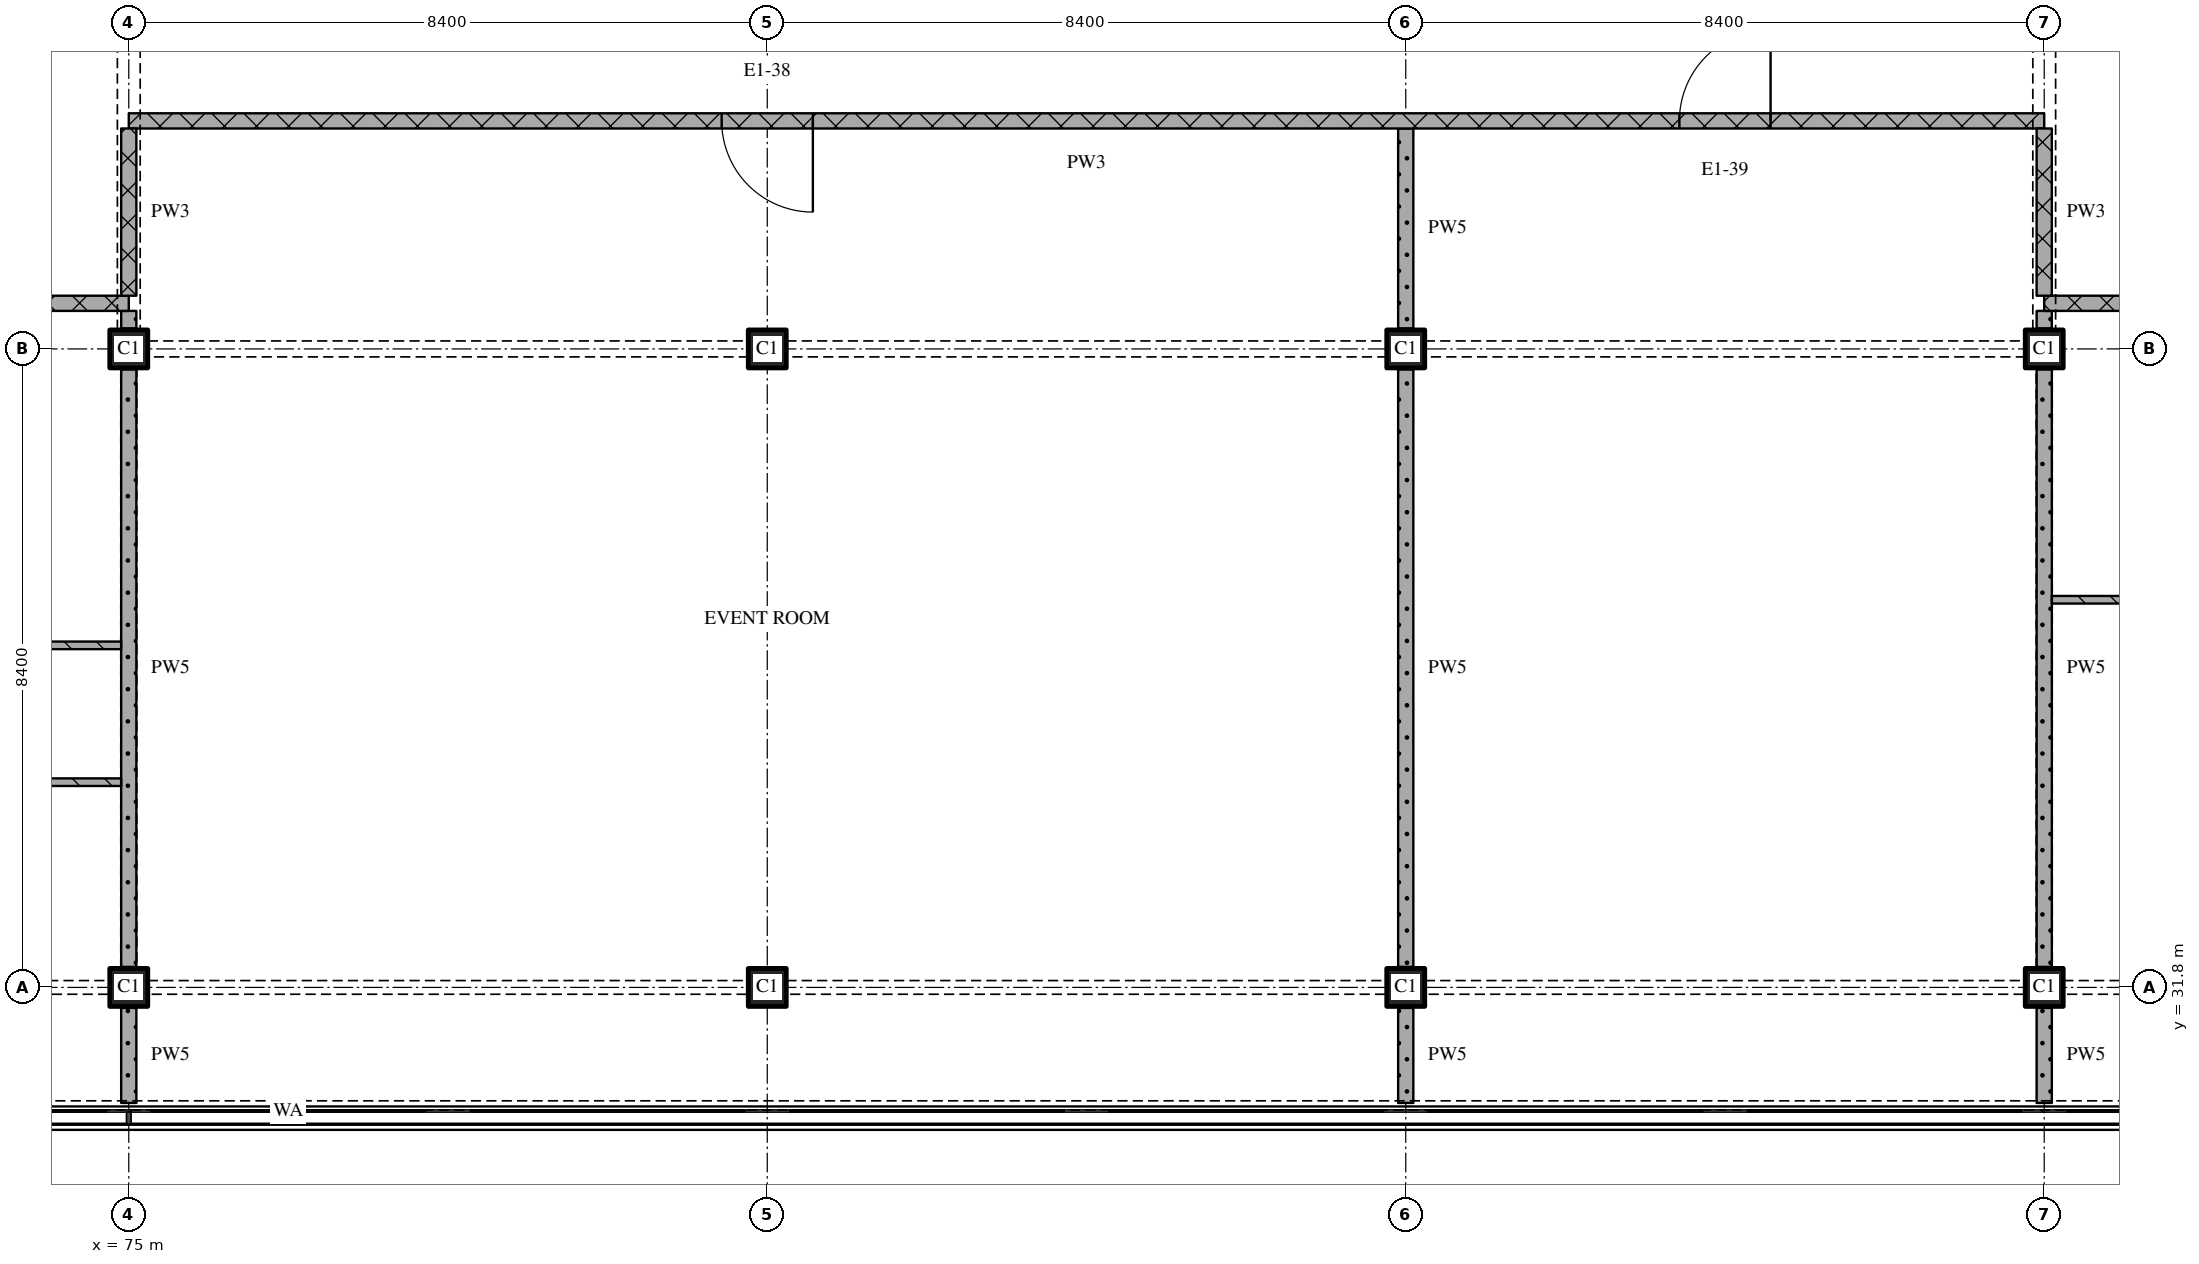
"""IFC4 building model, lengths in metres.
Left out: names, types, materials, properties, quantities, classifications, styles, units other than length and angle.
Written with IfcOpenShell. Run it as: python <this file> out.ifc"""

import sys

from ifc_helpers import new_model, si_unit, direction, frame, frame_2d, origin, origin_2d, place, context, subcontext, project, spatial, rectangle, extrude, element, fill, save


model = new_model("IFC4")
c1 = context("Model", 3, precision=1e-05, world=origin(), true_north=direction((0.0, 1.0)))
c2 = subcontext(c1, "Body", "Model", "MODEL_VIEW")
j1 = project(units=[si_unit("LENGTHUNIT", "METRE"), si_unit("PLANEANGLEUNIT", "RADIAN")], contexts=[c1])
p1 = place(None, origin())
s1 = spatial("IfcSite", under=j1, at=p1, CompositionType="ELEMENT")
p2 = place(p1, origin())
s2 = spatial("IfcBuilding", under=s1, at=p2, CompositionType="ELEMENT")
p3 = place(p2, frame((0.0, 0.0, 267.15)))
s3 = spatial("IfcBuildingStorey", under=s2, at=p3, CompositionType="ELEMENT", Elevation=267.15)
for number, where, z_axis, x_axis in (
    (1, (75.0, 31.8, 0.0), (0.0, 0.0, 1.0), (1.0, 0.0, 0.0)),
    (2, (75.0, 40.2, 0.0), (0.0, 0.0, 1.0), (1.0, 0.0, 0.0)),
    (3, (83.4, 31.8, 0.0), (0.0, 0.0, 1.0), (1.0, 0.0, 0.0)),
    (4, (83.4, 40.2, 0.0), (0.0, 0.0, 1.0), (1.0, 0.0, 0.0)),
    (5, (91.8, 31.8, 0.0), (0.0, 0.0, 1.0), (1.0, 0.0, 0.0)),
    (6, (91.8, 40.2, 0.0), (0.0, 0.0, 1.0), (1.0, 0.0, 0.0)),
    (7, (100.2, 31.8, 0.0), (0.0, 0.0, 1.0), (1.0, 0.0, 0.0)),
    (8, (100.2, 40.2, 0.0), (0.0, 0.0, 1.0), (1.0, 0.0, 0.0)),
):
    element("IfcColumn", number, at=place(p3, frame(where, z_axis=z_axis, x_axis=x_axis)), inside=s3, PredefinedType="COLUMN", context=c2, shape_type="SweptSolid", body=[
        extrude(rectangle(XDim=0.5, YDim=0.5, at=origin_2d()), origin(), (0.0, 0.0, 1.0), 3.6),
    ])
p4 = place(p3, frame((74.9, 34.5, 0.0), z_axis=(0.0, 0.0, 1.0), x_axis=(-1.0, 0.0, 0.0)))
e9 = element("IfcWall", 9, at=p4, inside=s3, PredefinedType="PARTITIONING", context=c2, shape_type="SweptSolid", body=[
    extrude(rectangle(XDim=16.7, YDim=0.1, at=frame_2d((8.35, 0.0))), origin(), (0.0, 0.0, 1.0), 3.32),
])
p5 = place(p4, frame((3.65, 0.0, 0.0)))
e10 = element("IfcOpeningElement", 10, at=p5, cuts=e9, PredefinedType="OPENING", context=c2, shape_type="SweptSolid", body=[
    extrude(rectangle(XDim=0.9, YDim=2.1, at=frame_2d((0.45, 1.05))), frame((0.0, 0.06, 0.0), z_axis=(0.0, -1.0, 0.0), x_axis=(1.0, 0.0, 0.0)), (0.0, 0.0, 1.0), 0.12),
])
p6 = place(p4, frame((12.05, 0.0, 0.0)))
e11 = element("IfcOpeningElement", 11, at=p6, cuts=e9, PredefinedType="OPENING", context=c2, shape_type="SweptSolid", body=[
    extrude(rectangle(XDim=0.9, YDim=2.1, at=frame_2d((0.45, 1.05))), frame((0.0, 0.06, 0.0), z_axis=(0.0, -1.0, 0.0), x_axis=(1.0, 0.0, 0.0)), (0.0, 0.0, 1.0), 0.12),
])
p7 = place(p3, frame((69.0, 36.3, 0.0), z_axis=(0.0, 0.0, 1.0), x_axis=(1.0, 0.0, 0.0)))
e12 = element("IfcWall", 12, at=p7, inside=s3, PredefinedType="PARTITIONING", context=c2, shape_type="SweptSolid", body=[
    extrude(rectangle(XDim=5.9, YDim=0.1, at=frame_2d((2.95, 0.0))), origin(), (0.0, 0.0, 1.0), 3.32),
])
p8 = place(p7, frame((2.55, 0.0, 0.0)))
e13 = element("IfcOpeningElement", 13, at=p8, cuts=e12, PredefinedType="OPENING", context=c2, shape_type="SweptSolid", body=[
    extrude(rectangle(XDim=0.9, YDim=2.1, at=frame_2d((0.45, 1.05))), frame((0.0, 0.06, 0.0), z_axis=(0.0, -1.0, 0.0), x_axis=(1.0, 0.0, 0.0)), (0.0, 0.0, 1.0), 0.12),
])
p9 = place(p3, frame((100.3, 36.9, 0.0), z_axis=(0.0, 0.0, 1.0), x_axis=(1.0, 0.0, 0.0)))
e14 = element("IfcWall", 14, at=p9, inside=s3, PredefinedType="PARTITIONING", context=c2, shape_type="SweptSolid", body=[
    extrude(rectangle(XDim=4.1, YDim=0.1, at=frame_2d((2.05, 0.0))), origin(), (0.0, 0.0, 1.0), 3.32),
])
p10 = place(p3, frame((75.0, 40.8, 0.0), z_axis=(0.0, 0.0, 1.0), x_axis=(-1.0, 0.0, 0.0)))
e15 = element("IfcWall", 15, at=p10, inside=s3, PredefinedType="PARTITIONING", context=c2, shape_type="SweptSolid", body=[
    extrude(rectangle(XDim=26.72, YDim=0.2, at=frame_2d((13.36, 0.0))), origin(), (0.0, 0.0, 1.0), 3.32),
])
p11 = place(p10, frame((13.75, 0.0, 0.0)))
e16 = element("IfcOpeningElement", 16, at=p11, cuts=e15, PredefinedType="OPENING", context=c2, shape_type="SweptSolid", body=[
    extrude(rectangle(XDim=1.0, YDim=2.1, at=frame_2d((0.5, 1.05))), frame((0.0, 0.11, 0.0), z_axis=(0.0, -1.0, 0.0), x_axis=(1.0, 0.0, 0.0)), (0.0, 0.0, 1.0), 0.22),
])
p12 = place(p3, frame((126.92, 40.8, 0.0), z_axis=(0.0, 0.0, 1.0), x_axis=(-1.0, 0.0, 0.0)))
e17 = element("IfcWall", 17, at=p12, inside=s3, PredefinedType="PARTITIONING", context=c2, shape_type="SweptSolid", body=[
    extrude(rectangle(XDim=26.72, YDim=0.2, at=frame_2d((13.36, 0.0))), origin(), (0.0, 0.0, 1.0), 3.32),
])
p13 = place(p12, frame((10.47, 0.0, 0.0)))
e18 = element("IfcOpeningElement", 18, at=p13, cuts=e17, PredefinedType="OPENING", context=c2, shape_type="SweptSolid", body=[
    extrude(rectangle(XDim=1.0, YDim=2.1, at=frame_2d((0.5, 1.05))), frame((0.0, 0.11, 0.0), z_axis=(0.0, -1.0, 0.0), x_axis=(1.0, 0.0, 0.0)), (0.0, 0.0, 1.0), 0.22),
])
p14 = place(p3, frame((100.2, 43.2, 0.0), z_axis=(0.0, 0.0, 1.0), x_axis=(-1.0, 0.0, 0.0)))
e19 = element("IfcWall", 19, at=p14, inside=s3, PredefinedType="PARTITIONING", context=c2, shape_type="SweptSolid", body=[
    extrude(rectangle(XDim=25.2, YDim=0.2, at=frame_2d((12.6, 0.0))), origin(), (0.0, 0.0, 1.0), 3.32),
])
p15 = place(p14, frame((3.6, 0.0, 0.0)))
e20 = element("IfcOpeningElement", 20, at=p15, cuts=e19, PredefinedType="OPENING", context=c2, shape_type="SweptSolid", body=[
    extrude(rectangle(XDim=1.2, YDim=2.1, at=frame_2d((0.6, 1.05))), frame((0.0, 0.11, 0.0), z_axis=(0.0, -1.0, 0.0), x_axis=(1.0, 0.0, 0.0)), (0.0, 0.0, 1.0), 0.22),
])
p16 = place(p14, frame((16.2, 0.0, 0.0)))
e21 = element("IfcOpeningElement", 21, at=p16, cuts=e19, PredefinedType="OPENING", context=c2, shape_type="SweptSolid", body=[
    extrude(rectangle(XDim=1.2, YDim=2.1, at=frame_2d((0.6, 1.05))), frame((0.0, 0.11, 0.0), z_axis=(0.0, -1.0, 0.0), x_axis=(1.0, 0.0, 0.0)), (0.0, 0.0, 1.0), 0.22),
])
p17 = place(p3, frame((75.0, 43.1, 0.0), z_axis=(0.0, 0.0, 1.0), x_axis=(0.0, -1.0, 0.0)))
e22 = element("IfcWall", 22, at=p17, inside=s3, PredefinedType="PARTITIONING", context=c2, shape_type="SweptSolid", body=[
    extrude(rectangle(XDim=2.2, YDim=0.2, at=frame_2d((1.1, 0.0))), origin(), (0.0, 0.0, 1.0), 2.53),
])
p18 = place(p3, frame((75.0, 31.53, 0.0), z_axis=(0.0, 0.0, 1.0), x_axis=(0.0, -1.0, 0.0)))
e23 = element("IfcWall", 23, at=p18, inside=s3, PredefinedType="PARTITIONING", context=c2, shape_type="SweptSolid", body=[
    extrude(rectangle(XDim=1.25, YDim=0.2, at=frame_2d((0.625, 0.0))), origin(), (0.0, 0.0, 1.0), 3.32),
])
p19 = place(p3, frame((75.0, 39.93, 0.0), z_axis=(0.0, 0.0, 1.0), x_axis=(0.0, -1.0, 0.0)))
e24 = element("IfcWall", 24, at=p19, inside=s3, PredefinedType="PARTITIONING", context=c2, shape_type="SweptSolid", body=[
    extrude(rectangle(XDim=7.86, YDim=0.2, at=frame_2d((3.93, 0.0))), origin(), (0.0, 0.0, 1.0), 2.77),
])
p20 = place(p3, frame((75.0, 40.7, 0.0), z_axis=(0.0, 0.0, 1.0), x_axis=(0.0, -1.0, 0.0)))
e25 = element("IfcWall", 25, at=p20, inside=s3, PredefinedType="PARTITIONING", context=c2, shape_type="SweptSolid", body=[
    extrude(rectangle(XDim=0.23, YDim=0.2, at=frame_2d((0.115, 0.0))), origin(), (0.0, 0.0, 1.0), 3.32),
])
p21 = place(p3, frame((91.8, 31.53, 0.0), z_axis=(0.0, 0.0, 1.0), x_axis=(0.0, -1.0, 0.0)))
e26 = element("IfcWall", 26, at=p21, inside=s3, PredefinedType="PARTITIONING", context=c2, shape_type="SweptSolid", body=[
    extrude(rectangle(XDim=1.25, YDim=0.2, at=frame_2d((0.625, 0.0))), origin(), (0.0, 0.0, 1.0), 3.32),
])
p22 = place(p3, frame((91.8, 39.93, 0.0), z_axis=(0.0, 0.0, 1.0), x_axis=(0.0, -1.0, 0.0)))
e27 = element("IfcWall", 27, at=p22, inside=s3, PredefinedType="PARTITIONING", context=c2, shape_type="SweptSolid", body=[
    extrude(rectangle(XDim=7.86, YDim=0.2, at=frame_2d((3.93, 0.0))), origin(), (0.0, 0.0, 1.0), 3.32),
])
p23 = place(p3, frame((91.8, 43.1, 0.0), z_axis=(0.0, 0.0, 1.0), x_axis=(0.0, -1.0, 0.0)))
e28 = element("IfcWall", 28, at=p23, inside=s3, PredefinedType="PARTITIONING", context=c2, shape_type="SweptSolid", body=[
    extrude(rectangle(XDim=2.63, YDim=0.2, at=frame_2d((1.315, 0.0))), origin(), (0.0, 0.0, 1.0), 3.32),
])
p24 = place(p3, frame((100.2, 43.1, 0.0), z_axis=(0.0, 0.0, 1.0), x_axis=(0.0, -1.0, 0.0)))
e29 = element("IfcWall", 29, at=p24, inside=s3, PredefinedType="PARTITIONING", context=c2, shape_type="SweptSolid", body=[
    extrude(rectangle(XDim=2.2, YDim=0.2, at=frame_2d((1.1, 0.0))), origin(), (0.0, 0.0, 1.0), 2.53),
])
p25 = place(p3, frame((100.2, 31.53, 0.0), z_axis=(0.0, 0.0, 1.0), x_axis=(0.0, -1.0, 0.0)))
e30 = element("IfcWall", 30, at=p25, inside=s3, PredefinedType="PARTITIONING", context=c2, shape_type="SweptSolid", body=[
    extrude(rectangle(XDim=1.25, YDim=0.2, at=frame_2d((0.625, 0.0))), origin(), (0.0, 0.0, 1.0), 3.32),
])
p26 = place(p3, frame((100.2, 39.93, 0.0), z_axis=(0.0, 0.0, 1.0), x_axis=(0.0, -1.0, 0.0)))
e31 = element("IfcWall", 31, at=p26, inside=s3, PredefinedType="PARTITIONING", context=c2, shape_type="SweptSolid", body=[
    extrude(rectangle(XDim=7.86, YDim=0.2, at=frame_2d((3.93, 0.0))), origin(), (0.0, 0.0, 1.0), 2.77),
])
p27 = place(p3, frame((100.2, 40.7, 0.0), z_axis=(0.0, 0.0, 1.0), x_axis=(0.0, -1.0, 0.0)))
e32 = element("IfcWall", 32, at=p27, inside=s3, PredefinedType="PARTITIONING", context=c2, shape_type="SweptSolid", body=[
    extrude(rectangle(XDim=0.23, YDim=0.2, at=frame_2d((0.115, 0.0))), origin(), (0.0, 0.0, 1.0), 3.32),
])
p28 = place(p15, origin())
e33 = element("IfcDoor", 33, at=p28, inside=s3, OperationType="SINGLE_SWING_RIGHT", PredefinedType="DOOR", context=c2, shape_type="SweptSolid", body=[
    extrude(rectangle(XDim=1.2, YDim=2.1, at=frame_2d((0.6, 1.05))), frame((0.0, 0.025, 0.0), z_axis=(0.0, -1.0, 0.0), x_axis=(1.0, 0.0, 0.0)), (0.0, 0.0, 1.0), 0.05),
])
fill(e20, e33)
p29 = place(p16, origin())
e34 = element("IfcDoor", 34, at=p29, inside=s3, OperationType="SINGLE_SWING_LEFT", PredefinedType="DOOR", context=c2, shape_type="SweptSolid", body=[
    extrude(rectangle(XDim=1.2, YDim=2.1, at=frame_2d((0.6, 1.05))), frame((0.0, 0.025, 0.0), z_axis=(0.0, -1.0, 0.0), x_axis=(1.0, 0.0, 0.0)), (0.0, 0.0, 1.0), 0.05),
])
fill(e21, e34)
save(model, sys.argv[1])
